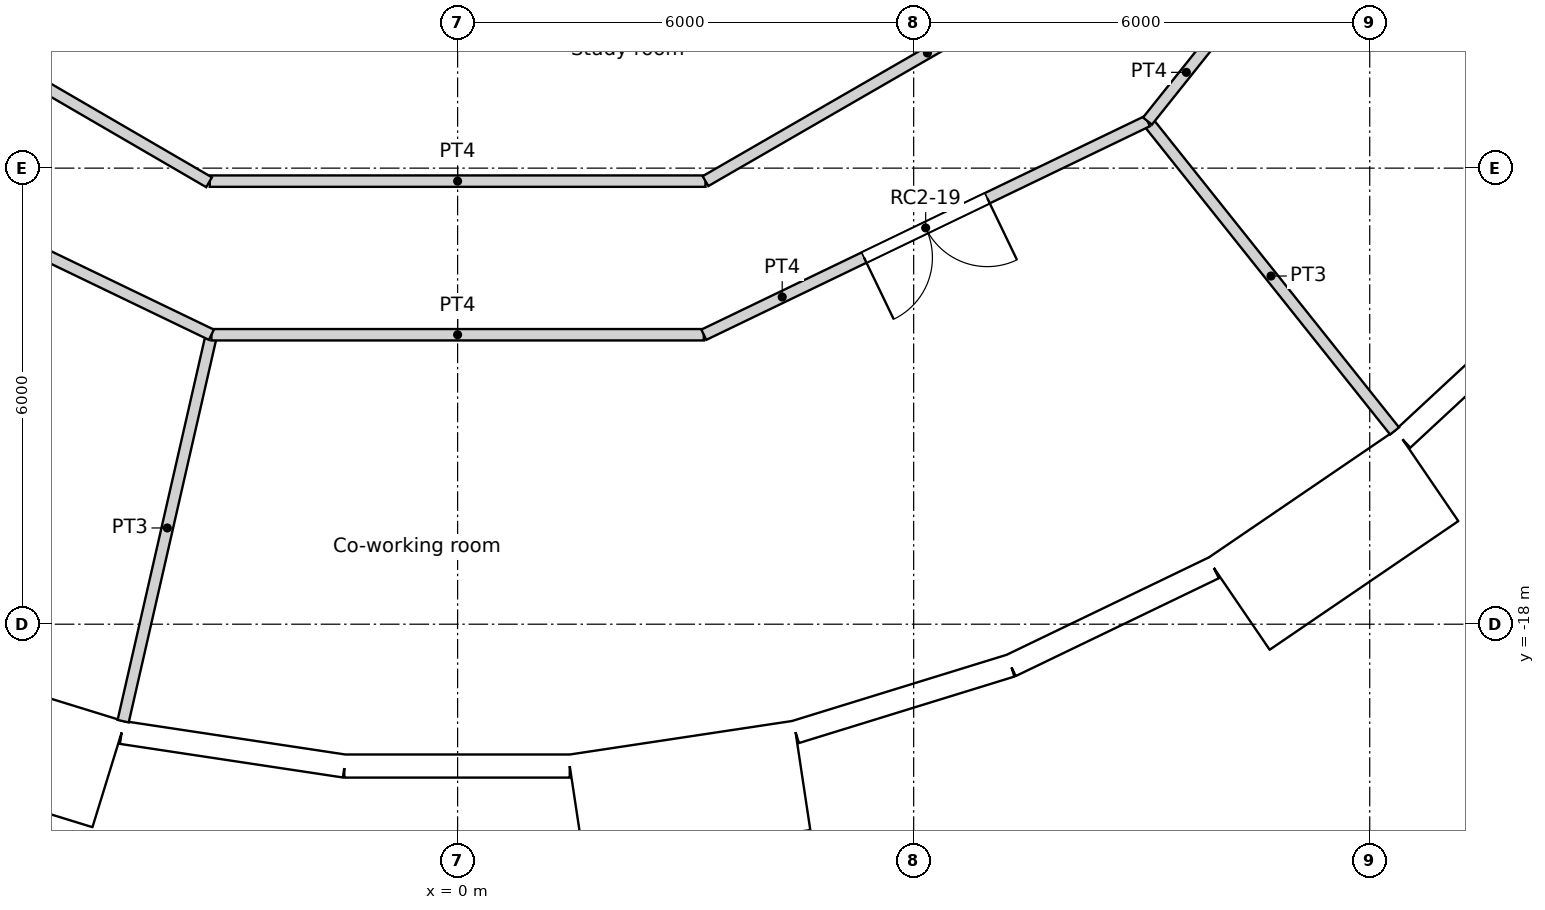
"""IFC4 building model, lengths in metres.
Left out: names, types, materials, properties, quantities, classifications, styles, units other than length and angle.
Written with IfcOpenShell. Run it as: python <this file> out.ifc"""

import sys

from ifc_helpers import new_model, si_unit, direction, frame, frame_2d, origin, origin_2d, place, context, subcontext, project, spatial, rectangle, circle, extrude, element, fill, save


model = new_model("IFC4")
c1 = context("Model", 3, precision=1e-05, world=origin(), true_north=direction((0.0, 1.0)))
c2 = subcontext(c1, "Body", "Model", "MODEL_VIEW")
j1 = project(units=[si_unit("LENGTHUNIT", "METRE"), si_unit("PLANEANGLEUNIT", "RADIAN")], contexts=[c1])
p1 = place(None, origin())
s1 = spatial("IfcSite", under=j1, at=p1, CompositionType="ELEMENT")
p2 = place(p1, origin())
s2 = spatial("IfcBuilding", under=s1, at=p2, CompositionType="ELEMENT")
p3 = place(p2, frame((0.0, 0.0, 241.8)))
s3 = spatial("IfcBuildingStorey", under=s2, at=p3, CompositionType="ELEMENT", Elevation=241.8)
for number, where, z_axis, x_axis in (
    (1, (-4.188, -18.35, 0.0), (0.0, 0.0, 1.0), (1.0, 0.0, 0.0)),
    (2, (1.406, -18.77, 0.0), (0.0, 0.0, 1.0), (1.0, 0.0, 0.0)),
    (3, (6.876, -17.521, 0.0), (0.0, 0.0, 1.0), (1.0, 0.0, 0.0)),
    (4, (11.735, -14.716, 0.0), (0.0, 0.0, 1.0), (1.0, 0.0, 0.0)),
):
    element("IfcColumn", number, at=place(p3, frame(where, z_axis=z_axis, x_axis=x_axis)), inside=s3, PredefinedType="COLUMN", context=c2, shape_type="SweptSolid", body=[
        extrude(circle(Radius=0.55, at=origin_2d()), origin(), (0.0, 0.0, 1.0), 3.6),
    ])
p4 = place(p3, frame((-7.458, -19.091, -0.35), z_axis=(0.0, 0.0, 1.0), x_axis=(0.955571139978, -0.294760574774, 0.0)))
e5 = element("IfcWall", 5, at=p4, inside=s3, PredefinedType="ELEMENTEDWALL", context=c2, shape_type="SweptSolid", body=[
    extrude(rectangle(XDim=3.0, YDim=1.45, at=frame_2d((1.5, 0.0))), origin(), (0.0, 0.0, 1.0), 3.6),
])
p5 = place(p4, frame((1.5, 0.0, 1.9)))
e6 = element("IfcOpeningElement", 6, at=p5, cuts=e5, PredefinedType="OPENING", context=c2, shape_type="SweptSolid", body=[
    extrude(circle(Radius=0.9, at=origin_2d()), frame((0.0, 0.735, 0.0), z_axis=(0.0, -1.0, 0.0), x_axis=(1.0, 0.0, 0.0)), (0.0, 0.0, 1.0), 1.47),
])
p6 = place(p3, frame((-4.418, -19.425, 0.0), z_axis=(0.0, 0.0, 1.0), x_axis=(0.988835775663, -0.149009425104, 0.0)))
e7 = element("IfcWall", 7, at=p6, inside=s3, PredefinedType="SOLIDWALL", context=c2, shape_type="SweptSolid", body=[
    extrude(rectangle(XDim=2.962, YDim=0.3, at=frame_2d((1.481, 0.0))), origin(), (0.0, 0.0, 1.0), 3.25),
])
p7 = place(p6, frame((1.481, 0.0, 1.55)))
e8 = element("IfcOpeningElement", 8, at=p7, cuts=e7, PredefinedType="OPENING", context=c2, shape_type="SweptSolid", body=[
    extrude(circle(Radius=0.9, at=origin_2d()), frame((0.0, 0.16, 0.0), z_axis=(0.0, -1.0, 0.0), x_axis=(1.0, 0.0, 0.0)), (0.0, 0.0, 1.0), 0.32),
])
p8 = place(p3, frame((-1.489, -19.866, 0.0), z_axis=(0.0, 0.0, 1.0), x_axis=(1.0, 0.0, 0.0)))
e9 = element("IfcWall", 9, at=p8, inside=s3, PredefinedType="SOLIDWALL", context=c2, shape_type="SweptSolid", body=[
    extrude(rectangle(XDim=2.962, YDim=0.3, at=frame_2d((1.481, 0.0))), origin(), (0.0, 0.0, 1.0), 3.25),
])
p9 = place(p8, frame((1.481, 0.0, 1.55)))
e10 = element("IfcOpeningElement", 10, at=p9, cuts=e9, PredefinedType="OPENING", context=c2, shape_type="SweptSolid", body=[
    extrude(circle(Radius=0.9, at=origin_2d()), frame((0.0, 0.16, 0.0), z_axis=(0.0, -1.0, 0.0), x_axis=(1.0, 0.0, 0.0)), (0.0, 0.0, 1.0), 0.32),
])
p10 = place(p3, frame((1.563, -20.436, -0.35), z_axis=(0.0, 0.0, 1.0), x_axis=(0.988836445254, 0.149004981587, 0.0)))
e11 = element("IfcWall", 11, at=p10, inside=s3, PredefinedType="ELEMENTEDWALL", context=c2, shape_type="SweptSolid", body=[
    extrude(rectangle(XDim=3.0, YDim=1.45, at=frame_2d((1.5, 0.0))), origin(), (0.0, 0.0, 1.0), 3.6),
])
p11 = place(p10, frame((1.5, 0.0, 1.9)))
e12 = element("IfcOpeningElement", 12, at=p11, cuts=e11, PredefinedType="OPENING", context=c2, shape_type="SweptSolid", body=[
    extrude(circle(Radius=0.9, at=origin_2d()), frame((0.0, 0.735, 0.0), z_axis=(0.0, -1.0, 0.0), x_axis=(1.0, 0.0, 0.0)), (0.0, 0.0, 1.0), 1.47),
])
p12 = place(p3, frame((4.448, -19.418, 0.0), z_axis=(0.0, 0.0, 1.0), x_axis=(0.95558635705, 0.294711238707, 0.0)))
e13 = element("IfcWall", 13, at=p12, inside=s3, PredefinedType="SOLIDWALL", context=c2, shape_type="SweptSolid", body=[
    extrude(rectangle(XDim=2.962, YDim=0.3, at=frame_2d((1.481, 0.0))), origin(), (0.0, 0.0, 1.0), 3.25),
])
p13 = place(p12, frame((1.481, 0.0, 1.55)))
e14 = element("IfcOpeningElement", 14, at=p13, cuts=e13, PredefinedType="OPENING", context=c2, shape_type="SweptSolid", body=[
    extrude(circle(Radius=0.9, at=origin_2d()), frame((0.0, 0.16, 0.0), z_axis=(0.0, -1.0, 0.0), x_axis=(1.0, 0.0, 0.0)), (0.0, 0.0, 1.0), 0.32),
])
p14 = place(p3, frame((7.278, -18.545, 0.0), z_axis=(0.0, 0.0, 1.0), x_axis=(0.900939615635, 0.433944476838, 0.0)))
e15 = element("IfcWall", 15, at=p14, inside=s3, PredefinedType="SOLIDWALL", context=c2, shape_type="SweptSolid", body=[
    extrude(rectangle(XDim=2.962, YDim=0.3, at=frame_2d((1.481, 0.0))), origin(), (0.0, 0.0, 1.0), 3.25),
])
p15 = place(p14, frame((1.481, 0.0, 1.55)))
e16 = element("IfcOpeningElement", 16, at=p15, cuts=e15, PredefinedType="OPENING", context=c2, shape_type="SweptSolid", body=[
    extrude(circle(Radius=0.9, at=origin_2d()), frame((0.0, 0.16, 0.0), z_axis=(0.0, -1.0, 0.0), x_axis=(1.0, 0.0, 0.0)), (0.0, 0.0, 1.0), 0.32),
])
p16 = place(p3, frame((10.275, -17.734, -0.35), z_axis=(0.0, 0.0, 1.0), x_axis=(0.826246281157, 0.563309047392, 0.0)))
e17 = element("IfcWall", 17, at=p16, inside=s3, PredefinedType="ELEMENTEDWALL", context=c2, shape_type="SweptSolid", body=[
    extrude(rectangle(XDim=3.0, YDim=1.45, at=frame_2d((1.5, 0.0))), origin(), (0.0, 0.0, 1.0), 3.6),
])
p17 = place(p16, frame((1.5, 0.0, 1.9)))
e18 = element("IfcOpeningElement", 18, at=p17, cuts=e17, PredefinedType="OPENING", context=c2, shape_type="SweptSolid", body=[
    extrude(circle(Radius=0.9, at=origin_2d()), frame((0.0, 0.735, 0.0), z_axis=(0.0, -1.0, 0.0), x_axis=(1.0, 0.0, 0.0)), (0.0, 0.0, 1.0), 1.47),
])
p18 = place(p3, frame((12.432, -15.565, 0.0), z_axis=(0.0, 0.0, 1.0), x_axis=(0.733066412643, 0.680157066165, 0.0)))
e19 = element("IfcWall", 19, at=p18, inside=s3, PredefinedType="SOLIDWALL", context=c2, shape_type="SweptSolid", body=[
    extrude(rectangle(XDim=2.962, YDim=0.3, at=frame_2d((1.481, 0.0))), origin(), (0.0, 0.0, 1.0), 3.25),
])
p19 = place(p18, frame((1.481, 0.0, 1.55)))
e20 = element("IfcOpeningElement", 20, at=p19, cuts=e19, PredefinedType="OPENING", context=c2, shape_type="SweptSolid", body=[
    extrude(circle(Radius=0.9, at=origin_2d()), frame((0.0, 0.16, 0.0), z_axis=(0.0, -1.0, 0.0), x_axis=(1.0, 0.0, 0.0)), (0.0, 0.0, 1.0), 0.32),
])
p20 = place(p3, frame((-9.092, -8.8, 0.0), z_axis=(0.0, 0.0, 1.0), x_axis=(0.864470922103, -0.502682827277, 0.0)))
e21 = element("IfcWall", 21, at=p20, inside=s3, PredefinedType="PARTITIONING", context=c2, shape_type="SweptSolid", body=[
    extrude(rectangle(XDim=6.735, YDim=0.15, at=frame_2d((3.368, 0.0))), origin(), (0.0, 0.0, 1.0), 3.25),
])
p21 = place(p3, frame((-3.261, -12.171, 0.0), z_axis=(0.0, 0.0, 1.0), x_axis=(1.0, 0.0, 0.0)))
e22 = element("IfcWall", 22, at=p21, inside=s3, PredefinedType="PARTITIONING", context=c2, shape_type="SweptSolid", body=[
    extrude(rectangle(XDim=6.522, YDim=0.15, at=frame_2d((3.261, 0.0))), origin(), (0.0, 0.0, 1.0), 3.25),
])
p22 = place(p3, frame((3.261, -12.171, 0.0), z_axis=(0.0, 0.0, 1.0), x_axis=(0.866066809554, 0.499928276245, 0.0)))
e23 = element("IfcWall", 23, at=p22, inside=s3, PredefinedType="PARTITIONING", context=c2, shape_type="SweptSolid", body=[
    extrude(rectangle(XDim=6.743, YDim=0.15, at=frame_2d((3.371, 0.0))), origin(), (0.0, 0.0, 1.0), 3.25),
])
p23 = place(p3, frame((-9.076, -11.381, 0.0), z_axis=(0.0, 0.0, 1.0), x_axis=(0.900976027191, -0.433868872388, 0.0)))
e24 = element("IfcWall", 24, at=p23, inside=s3, PredefinedType="PARTITIONING", context=c2, shape_type="SweptSolid", body=[
    extrude(rectangle(XDim=6.479, YDim=0.15, at=frame_2d((3.239, 0.0))), origin(), (0.0, 0.0, 1.0), 3.25),
])
p24 = place(p23, frame((2.74, 0.0, 0.0)))
e25 = element("IfcOpeningElement", 25, at=p24, cuts=e24, PredefinedType="OPENING", context=c2, shape_type="SweptSolid", body=[
    extrude(rectangle(XDim=1.0, YDim=2.04, at=frame_2d((0.5, 1.02))), frame((0.0, 0.075, 0.0), z_axis=(0.0, -1.0, 0.0), x_axis=(1.0, 0.0, 0.0)), (0.0, 0.0, 1.0), 0.15),
])
p25 = place(p3, frame((3.239, -14.192, 0.0), z_axis=(0.0, 0.0, 1.0), x_axis=(0.900976027191, 0.433868872388, 0.0)))
e26 = element("IfcWall", 26, at=p25, inside=s3, PredefinedType="PARTITIONING", context=c2, shape_type="SweptSolid", body=[
    extrude(rectangle(XDim=6.479, YDim=0.15, at=frame_2d((3.239, 0.0))), origin(), (0.0, 0.0, 1.0), 3.25),
])
p26 = place(p25, frame((2.34, 0.0, 0.0)))
e27 = element("IfcOpeningElement", 27, at=p26, cuts=e26, PredefinedType="OPENING", context=c2, shape_type="SweptSolid", body=[
    extrude(rectangle(XDim=1.8, YDim=2.1, at=frame_2d((0.9, 1.05))), frame((0.0, 0.075, 0.0), z_axis=(0.0, -1.0, 0.0), x_axis=(1.0, 0.0, 0.0)), (0.0, 0.0, 1.0), 0.15),
])
p27 = place(p3, frame((-3.239, -14.192, 0.0), z_axis=(0.0, 0.0, 1.0), x_axis=(1.0, 0.0, 0.0)))
e28 = element("IfcWall", 28, at=p27, inside=s3, PredefinedType="PARTITIONING", context=c2, shape_type="SweptSolid", body=[
    extrude(rectangle(XDim=6.478, YDim=0.15, at=frame_2d((3.239, 0.0))), origin(), (0.0, 0.0, 1.0), 3.25),
])
p28 = place(p3, frame((9.076, -11.381, 0.0), z_axis=(0.0, 0.0, 1.0), x_axis=(0.623805208652, 0.781579849829, 0.0)))
e29 = element("IfcWall", 29, at=p28, inside=s3, PredefinedType="PARTITIONING", context=c2, shape_type="SweptSolid", body=[
    extrude(rectangle(XDim=1.64, YDim=0.15, at=frame_2d((0.82, 0.0))), origin(), (0.0, 0.0, 1.0), 3.25),
])
p29 = place(p3, frame((-4.4, -19.276, 0.0), z_axis=(0.0, 0.0, 1.0), x_axis=(0.222612505682, 0.974907007008, 0.0)))
e30 = element("IfcWall", 30, at=p29, inside=s3, PredefinedType="PARTITIONING", context=c2, shape_type="SweptSolid", body=[
    extrude(rectangle(XDim=5.215, YDim=0.15, at=frame_2d((2.607, 0.0))), origin(), (0.0, 0.0, 1.0), 3.25),
])
p30 = place(p3, frame((9.076, -11.381, 0.0), z_axis=(0.0, 0.0, 1.0), x_axis=(0.623460949534, -0.781854490558, 0.0)))
e31 = element("IfcWall", 31, at=p30, inside=s3, PredefinedType="PARTITIONING", context=c2, shape_type="SweptSolid", body=[
    extrude(rectangle(XDim=5.214, YDim=0.15, at=frame_2d((2.607, 0.0))), origin(), (0.0, 0.0, 1.0), 3.25),
])
p31 = place(p5, origin())
e32 = element("IfcWindow", 32, at=p31, inside=s3, PartitioningType="SINGLE_PANEL", PredefinedType="WINDOW", context=c2, shape_type="SweptSolid", body=[
    extrude(circle(Radius=0.9, at=origin_2d()), frame((0.0, 0.695, 0.0), z_axis=(0.0, -1.0, 0.0), x_axis=(1.0, 0.0, 0.0)), (0.0, 0.0, 1.0), 0.1),
])
fill(e6, e32)
p32 = place(p7, origin())
e33 = element("IfcWindow", 33, at=p32, inside=s3, PartitioningType="SINGLE_PANEL", PredefinedType="WINDOW", context=c2, shape_type="SweptSolid", body=[
    extrude(circle(Radius=0.9, at=origin_2d()), frame((0.0, 0.12, 0.0), z_axis=(0.0, -1.0, 0.0), x_axis=(1.0, 0.0, 0.0)), (0.0, 0.0, 1.0), 0.1),
])
fill(e8, e33)
p33 = place(p9, origin())
e34 = element("IfcWindow", 34, at=p33, inside=s3, PartitioningType="SINGLE_PANEL", PredefinedType="WINDOW", context=c2, shape_type="SweptSolid", body=[
    extrude(circle(Radius=0.9, at=origin_2d()), frame((0.0, 0.12, 0.0), z_axis=(0.0, -1.0, 0.0), x_axis=(1.0, 0.0, 0.0)), (0.0, 0.0, 1.0), 0.1),
])
fill(e10, e34)
p34 = place(p11, origin())
e35 = element("IfcWindow", 35, at=p34, inside=s3, PartitioningType="SINGLE_PANEL", PredefinedType="WINDOW", context=c2, shape_type="SweptSolid", body=[
    extrude(circle(Radius=0.9, at=origin_2d()), frame((0.0, 0.695, 0.0), z_axis=(0.0, -1.0, 0.0), x_axis=(1.0, 0.0, 0.0)), (0.0, 0.0, 1.0), 0.1),
])
fill(e12, e35)
p35 = place(p13, origin())
e36 = element("IfcWindow", 36, at=p35, inside=s3, PartitioningType="SINGLE_PANEL", PredefinedType="WINDOW", context=c2, shape_type="SweptSolid", body=[
    extrude(circle(Radius=0.9, at=origin_2d()), frame((0.0, 0.12, 0.0), z_axis=(0.0, -1.0, 0.0), x_axis=(1.0, 0.0, 0.0)), (0.0, 0.0, 1.0), 0.1),
])
fill(e14, e36)
p36 = place(p15, origin())
e37 = element("IfcWindow", 37, at=p36, inside=s3, PartitioningType="SINGLE_PANEL", PredefinedType="WINDOW", context=c2, shape_type="SweptSolid", body=[
    extrude(circle(Radius=0.9, at=origin_2d()), frame((0.0, 0.12, 0.0), z_axis=(0.0, -1.0, 0.0), x_axis=(1.0, 0.0, 0.0)), (0.0, 0.0, 1.0), 0.1),
])
fill(e16, e37)
p37 = place(p17, origin())
e38 = element("IfcWindow", 38, at=p37, inside=s3, PartitioningType="SINGLE_PANEL", PredefinedType="WINDOW", context=c2, shape_type="SweptSolid", body=[
    extrude(circle(Radius=0.9, at=origin_2d()), frame((0.0, 0.695, 0.0), z_axis=(0.0, -1.0, 0.0), x_axis=(1.0, 0.0, 0.0)), (0.0, 0.0, 1.0), 0.1),
])
fill(e18, e38)
p38 = place(p19, origin())
e39 = element("IfcWindow", 39, at=p38, inside=s3, PartitioningType="SINGLE_PANEL", PredefinedType="WINDOW", context=c2, shape_type="SweptSolid", body=[
    extrude(circle(Radius=0.9, at=origin_2d()), frame((0.0, 0.12, 0.0), z_axis=(0.0, -1.0, 0.0), x_axis=(1.0, 0.0, 0.0)), (0.0, 0.0, 1.0), 0.1),
])
fill(e20, e39)
p39 = place(p26, origin())
e40 = element("IfcDoor", 40, at=p39, inside=s3, OperationType="DOUBLE_DOOR_SINGLE_SWING", PredefinedType="DOOR", context=c2, shape_type="SweptSolid", body=[
    extrude(rectangle(XDim=1.8, YDim=2.1, at=frame_2d((0.9, 1.05))), frame((0.0, 0.025, 0.0), z_axis=(0.0, -1.0, 0.0), x_axis=(1.0, 0.0, 0.0)), (0.0, 0.0, 1.0), 0.05),
])
fill(e27, e40)
save(model, sys.argv[1])
